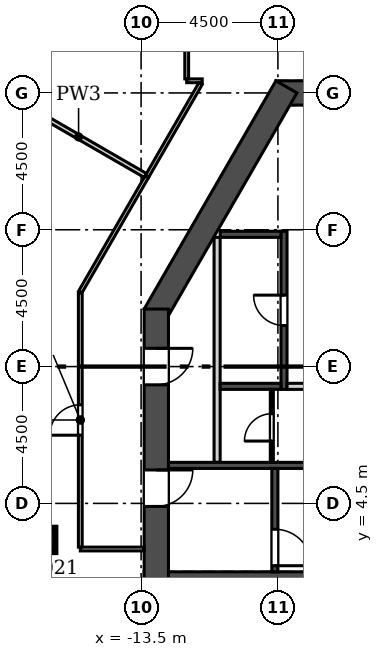
"""IFC4 building model, lengths in metres.
Left out: names, types, materials, properties, quantities, classifications, styles, units other than length and angle.
Written with IfcOpenShell. Run it as: python <this file> out.ifc"""

import sys

from ifc_helpers import new_model, si_unit, direction, frame, frame_2d, origin, origin_2d, place, context, subcontext, project, spatial, rectangle, extrude, element, fill, save


model = new_model("IFC4")
c1 = context("Model", 3, precision=1e-05, world=origin(), true_north=direction((0.0, 1.0)))
c2 = subcontext(c1, "Body", "Model", "MODEL_VIEW")
j1 = project(units=[si_unit("LENGTHUNIT", "METRE"), si_unit("PLANEANGLEUNIT", "RADIAN")], contexts=[c1])
p1 = place(None, origin())
s1 = spatial("IfcSite", under=j1, at=p1, CompositionType="ELEMENT")
p2 = place(p1, origin())
s2 = spatial("IfcBuilding", under=s1, at=p2, CompositionType="ELEMENT")
p3 = place(p2, frame((0.0, 0.0, 335.1)))
s3 = spatial("IfcBuildingStorey", under=s2, at=p3, CompositionType="ELEMENT", Elevation=335.1)
p4 = place(p3, frame((-16.721, 3.299, 0.0), z_axis=(0.0, 0.0, 1.0), x_axis=(1.0, 0.0, 0.0)))
e1 = element("IfcColumn", 1, at=p4, inside=s3, PredefinedType="COLUMN", context=c2, shape_type="SweptSolid", body=[
    extrude(rectangle(XDim=0.8, YDim=0.8, at=origin_2d()), origin(), (0.0, 0.0, 1.0), 4.2),
])
p5 = place(p3, frame((-13.4, 1.85, 0.0), z_axis=(0.0, 0.0, 1.0), x_axis=(1.0, 0.0, 0.0)))
e2 = element("IfcWall", 2, at=p5, inside=s3, PredefinedType="SHEAR", context=c2, shape_type="SweptSolid", body=[
    extrude(rectangle(XDim=26.8, YDim=0.8, at=frame_2d((13.4, 0.0))), origin(), (0.0, 0.0, 1.0), 4.2),
])
p6 = place(p3, frame((9.065, 18.0, 0.0), z_axis=(0.0, 0.0, 1.0), x_axis=(-1.0, 0.0, 0.0)))
e3 = element("IfcWall", 3, at=p6, inside=s3, PredefinedType="SHEAR", context=c2, shape_type="SweptSolid", body=[
    extrude(rectangle(XDim=18.13, YDim=0.8, at=frame_2d((9.065, 0.0))), origin(), (0.0, 0.0, 1.0), 4.2),
])
p7 = place(p6, frame((8.365, 0.0, 0.0)))
e4 = element("IfcOpeningElement", 4, at=p7, cuts=e3, PredefinedType="OPENING", context=c2, shape_type="SweptSolid", body=[
    extrude(rectangle(XDim=1.4, YDim=2.1, at=frame_2d((0.7, 1.05))), frame((0.0, 0.41, 0.0), z_axis=(0.0, -1.0, 0.0), x_axis=(1.0, 0.0, 0.0)), (0.0, 0.0, 1.0), 0.82),
])
p8 = place(p6, frame((11.065, 0.0, 0.0)))
e5 = element("IfcOpeningElement", 5, at=p8, cuts=e3, PredefinedType="OPENING", context=c2, shape_type="SweptSolid", body=[
    extrude(rectangle(XDim=6.0, YDim=2.4, at=frame_2d((3.0, 1.2))), frame((0.0, 0.41, 0.0), z_axis=(0.0, -1.0, 0.0), x_axis=(1.0, 0.0, 0.0)), (0.0, 0.0, 1.0), 0.82),
])
p9 = place(p6, frame((1.065, 0.0, 0.0)))
e6 = element("IfcOpeningElement", 6, at=p9, cuts=e3, PredefinedType="OPENING", context=c2, shape_type="SweptSolid", body=[
    extrude(rectangle(XDim=6.0, YDim=2.4, at=frame_2d((3.0, 1.2))), frame((0.0, 0.41, 0.0), z_axis=(0.0, -1.0, 0.0), x_axis=(1.0, 0.0, 0.0)), (0.0, 0.0, 1.0), 0.82),
])
p10 = place(p3, frame((-8.719, 18.2, 0.0), z_axis=(0.0, 0.0, 1.0), x_axis=(-0.500015780397, -0.866016292776, 0.0)))
e7 = element("IfcWall", 7, at=p10, inside=s3, PredefinedType="SHEAR", context=c2, shape_type="SweptSolid", body=[
    extrude(rectangle(XDim=8.67, YDim=0.8, at=frame_2d((4.335, 0.0))), origin(), (0.0, 0.0, 1.0), 4.2),
])
p11 = place(p3, frame((-13.0, 10.892, 0.0), z_axis=(0.0, 0.0, 1.0), x_axis=(0.0, -1.0, 0.0)))
e8 = element("IfcWall", 8, at=p11, inside=s3, PredefinedType="SHEAR", context=c2, shape_type="SweptSolid", body=[
    extrude(rectangle(XDim=9.442, YDim=0.8, at=frame_2d((4.721, 0.0))), origin(), (0.0, 0.0, 1.0), 4.2),
])
p12 = place(p11, frame((5.292, 0.0, 0.0)))
e9 = element("IfcOpeningElement", 9, at=p12, cuts=e8, PredefinedType="OPENING", context=c2, shape_type="SweptSolid", body=[
    extrude(rectangle(XDim=1.2, YDim=2.1, at=frame_2d((0.6, 1.05))), frame((0.0, 0.41, 0.0), z_axis=(0.0, -1.0, 0.0), x_axis=(1.0, 0.0, 0.0)), (0.0, 0.0, 1.0), 0.82),
])
p13 = place(p11, frame((1.292, 0.0, 0.0)))
e10 = element("IfcOpeningElement", 10, at=p13, cuts=e8, PredefinedType="OPENING", context=c2, shape_type="SweptSolid", body=[
    extrude(rectangle(XDim=1.2, YDim=2.1, at=frame_2d((0.6, 1.05))), frame((0.0, 0.41, 0.0), z_axis=(0.0, -1.0, 0.0), x_axis=(1.0, 0.0, 0.0)), (0.0, 0.0, 1.0), 0.82),
])
p14 = place(p3, frame((-4.353, 41.372, 0.0), z_axis=(0.0, 0.0, 1.0), x_axis=(-0.500001731347, -0.866024404189, 0.0)))
e11 = element("IfcWall", 11, at=p14, inside=s3, PredefinedType="SOLIDWALL", context=c2, shape_type="SweptSolid", body=[
    extrude(rectangle(XDim=38.87, YDim=0.34, at=frame_2d((19.435, 0.0))), origin(), (0.0, 0.0, 1.0), 3.8),
])
p15 = place(p14, frame((3.653, 0.0, 0.9)))
e12 = element("IfcOpeningElement", 12, at=p15, cuts=e11, PredefinedType="OPENING", context=c2, shape_type="SweptSolid", body=[
    extrude(rectangle(XDim=1.885, YDim=2.6, at=frame_2d((0.942, 1.3))), frame((0.0, 0.18, 0.0), z_axis=(0.0, -1.0, 0.0), x_axis=(1.0, 0.0, 0.0)), (0.0, 0.0, 1.0), 0.36),
])
p16 = place(p14, frame((6.653, 0.0, 0.9)))
e13 = element("IfcOpeningElement", 13, at=p16, cuts=e11, PredefinedType="OPENING", context=c2, shape_type="SweptSolid", body=[
    extrude(rectangle(XDim=1.885, YDim=2.6, at=frame_2d((0.942, 1.3))), frame((0.0, 0.18, 0.0), z_axis=(0.0, -1.0, 0.0), x_axis=(1.0, 0.0, 0.0)), (0.0, 0.0, 1.0), 0.36),
])
p17 = place(p14, frame((9.653, 0.0, 0.9)))
e14 = element("IfcOpeningElement", 14, at=p17, cuts=e11, PredefinedType="OPENING", context=c2, shape_type="SweptSolid", body=[
    extrude(rectangle(XDim=1.885, YDim=2.6, at=frame_2d((0.942, 1.3))), frame((0.0, 0.18, 0.0), z_axis=(0.0, -1.0, 0.0), x_axis=(1.0, 0.0, 0.0)), (0.0, 0.0, 1.0), 0.36),
])
p18 = place(p14, frame((12.653, 0.0, 0.9)))
e15 = element("IfcOpeningElement", 15, at=p18, cuts=e11, PredefinedType="OPENING", context=c2, shape_type="SweptSolid", body=[
    extrude(rectangle(XDim=1.885, YDim=2.6, at=frame_2d((0.942, 1.3))), frame((0.0, 0.18, 0.0), z_axis=(0.0, -1.0, 0.0), x_axis=(1.0, 0.0, 0.0)), (0.0, 0.0, 1.0), 0.36),
])
p19 = place(p14, frame((15.653, 0.0, 0.9)))
e16 = element("IfcOpeningElement", 16, at=p19, cuts=e11, PredefinedType="OPENING", context=c2, shape_type="SweptSolid", body=[
    extrude(rectangle(XDim=1.885, YDim=2.6, at=frame_2d((0.942, 1.3))), frame((0.0, 0.18, 0.0), z_axis=(0.0, -1.0, 0.0), x_axis=(1.0, 0.0, 0.0)), (0.0, 0.0, 1.0), 0.36),
])
p20 = place(p14, frame((18.653, 0.0, 0.9)))
e17 = element("IfcOpeningElement", 17, at=p20, cuts=e11, PredefinedType="OPENING", context=c2, shape_type="SweptSolid", body=[
    extrude(rectangle(XDim=1.885, YDim=2.6, at=frame_2d((0.942, 1.3))), frame((0.0, 0.18, 0.0), z_axis=(0.0, -1.0, 0.0), x_axis=(1.0, 0.0, 0.0)), (0.0, 0.0, 1.0), 0.36),
])
p21 = place(p14, frame((21.653, 0.0, 0.9)))
e18 = element("IfcOpeningElement", 18, at=p21, cuts=e11, PredefinedType="OPENING", context=c2, shape_type="SweptSolid", body=[
    extrude(rectangle(XDim=1.885, YDim=2.6, at=frame_2d((0.942, 1.3))), frame((0.0, 0.18, 0.0), z_axis=(0.0, -1.0, 0.0), x_axis=(1.0, 0.0, 0.0)), (0.0, 0.0, 1.0), 0.36),
])
p22 = place(p14, frame((24.653, 0.0, 0.9)))
e19 = element("IfcOpeningElement", 19, at=p22, cuts=e11, PredefinedType="OPENING", context=c2, shape_type="SweptSolid", body=[
    extrude(rectangle(XDim=1.885, YDim=2.6, at=frame_2d((0.942, 1.3))), frame((0.0, 0.18, 0.0), z_axis=(0.0, -1.0, 0.0), x_axis=(1.0, 0.0, 0.0)), (0.0, 0.0, 1.0), 0.36),
])
p23 = place(p14, frame((27.653, 0.0, 0.9)))
e20 = element("IfcOpeningElement", 20, at=p23, cuts=e11, PredefinedType="OPENING", context=c2, shape_type="SweptSolid", body=[
    extrude(rectangle(XDim=1.885, YDim=2.6, at=frame_2d((0.942, 1.3))), frame((0.0, 0.18, 0.0), z_axis=(0.0, -1.0, 0.0), x_axis=(1.0, 0.0, 0.0)), (0.0, 0.0, 1.0), 0.36),
])
p24 = place(p14, frame((30.653, 0.0, 0.9)))
e21 = element("IfcOpeningElement", 21, at=p24, cuts=e11, PredefinedType="OPENING", context=c2, shape_type="SweptSolid", body=[
    extrude(rectangle(XDim=1.885, YDim=2.6, at=frame_2d((0.942, 1.3))), frame((0.0, 0.18, 0.0), z_axis=(0.0, -1.0, 0.0), x_axis=(1.0, 0.0, 0.0)), (0.0, 0.0, 1.0), 0.36),
])
p25 = place(p14, frame((33.653, 0.0, 0.9)))
e22 = element("IfcOpeningElement", 22, at=p25, cuts=e11, PredefinedType="OPENING", context=c2, shape_type="SweptSolid", body=[
    extrude(rectangle(XDim=1.885, YDim=2.6, at=frame_2d((0.942, 1.3))), frame((0.0, 0.18, 0.0), z_axis=(0.0, -1.0, 0.0), x_axis=(1.0, 0.0, 0.0)), (0.0, 0.0, 1.0), 0.36),
])
p26 = place(p14, frame((1.269, 0.0, 0.9)))
e23 = element("IfcOpeningElement", 23, at=p26, cuts=e11, PredefinedType="OPENING", context=c2, shape_type="SweptSolid", body=[
    extrude(rectangle(XDim=1.115, YDim=2.4, at=frame_2d((0.558, 1.2))), frame((0.0, 0.18, 0.0), z_axis=(0.0, -1.0, 0.0), x_axis=(1.0, 0.0, 0.0)), (0.0, 0.0, 1.0), 0.36),
])
p27 = place(p14, frame((36.646, 0.0, 0.9)))
e24 = element("IfcOpeningElement", 24, at=p27, cuts=e11, PredefinedType="OPENING", context=c2, shape_type="SweptSolid", body=[
    extrude(rectangle(XDim=1.115, YDim=2.4, at=frame_2d((0.558, 1.2))), frame((0.0, 0.18, 0.0), z_axis=(0.0, -1.0, 0.0), x_axis=(1.0, 0.0, 0.0)), (0.0, 0.0, 1.0), 0.36),
])
p28 = place(p3, frame((-11.0, 5.85, 0.0), z_axis=(0.0, 0.0, 1.0), x_axis=(0.0, 1.0, 0.0)))
e25 = element("IfcWall", 25, at=p28, inside=s3, PredefinedType="SOLIDWALL", context=c2, shape_type="SweptSolid", body=[
    extrude(rectangle(XDim=7.4, YDim=0.2, at=frame_2d((3.7, 0.0))), origin(), (0.0, 0.0, 1.0), 3.8),
])
p29 = place(p3, frame((-8.8, 8.25, -0.4), z_axis=(0.0, 0.0, 1.0), x_axis=(0.0, 1.0, 0.0)))
e26 = element("IfcWall", 26, at=p29, inside=s3, PredefinedType="SOLIDWALL", context=c2, shape_type="SweptSolid", body=[
    extrude(rectangle(XDim=5.2, YDim=0.2, at=frame_2d((2.6, 0.0))), origin(), (0.0, 0.0, 1.0), 4.2),
])
p30 = place(p29, frame((2.1, 0.0, 0.4)))
e27 = element("IfcOpeningElement", 27, at=p30, cuts=e26, PredefinedType="OPENING", context=c2, shape_type="SweptSolid", body=[
    extrude(rectangle(XDim=1.0, YDim=2.1, at=frame_2d((0.5, 1.05))), frame((0.0, 0.11, 0.0), z_axis=(0.0, -1.0, 0.0), x_axis=(1.0, 0.0, 0.0)), (0.0, 0.0, 1.0), 0.22),
])
p31 = place(p3, frame((-10.9, 8.35, -0.4), z_axis=(0.0, 0.0, 1.0), x_axis=(1.0, 0.0, 0.0)))
e28 = element("IfcWall", 28, at=p31, inside=s3, PredefinedType="SOLIDWALL", context=c2, shape_type="SweptSolid", body=[
    extrude(rectangle(XDim=2.0, YDim=0.2, at=frame_2d((1.0, 0.0))), origin(), (0.0, 0.0, 1.0), 4.2),
])
p32 = place(p3, frame((-12.6, 5.75, -0.4), z_axis=(0.0, 0.0, 1.0), x_axis=(1.0, 0.0, 0.0)))
e29 = element("IfcWall", 29, at=p32, inside=s3, PredefinedType="SOLIDWALL", context=c2, shape_type="SweptSolid", body=[
    extrude(rectangle(XDim=11.4, YDim=0.2, at=frame_2d((5.7, 0.0))), origin(), (0.0, 0.0, 1.0), 4.2),
])
p33 = place(p3, frame((-9.1, 2.25, -0.4), z_axis=(0.0, 0.0, 1.0), x_axis=(0.0, 1.0, 0.0)))
e30 = element("IfcWall", 30, at=p33, inside=s3, PredefinedType="SOLIDWALL", context=c2, shape_type="SweptSolid", body=[
    extrude(rectangle(XDim=3.4, YDim=0.2, at=frame_2d((1.7, 0.0))), origin(), (0.0, 0.0, 1.0), 4.2),
])
p34 = place(p33, frame((0.2, 0.0, 0.4)))
e31 = element("IfcOpeningElement", 31, at=p34, cuts=e30, PredefinedType="OPENING", context=c2, shape_type="SweptSolid", body=[
    extrude(rectangle(XDim=1.2, YDim=2.1, at=frame_2d((0.6, 1.05))), frame((0.0, 0.11, 0.0), z_axis=(0.0, -1.0, 0.0), x_axis=(1.0, 0.0, 0.0)), (0.0, 0.0, 1.0), 0.22),
])
p35 = place(p3, frame((-10.9, 13.35, -0.4), z_axis=(0.0, 0.0, 1.0), x_axis=(1.0, 0.0, 0.0)))
e32 = element("IfcWall", 32, at=p35, inside=s3, PredefinedType="SOLIDWALL", context=c2, shape_type="SweptSolid", body=[
    extrude(rectangle(XDim=2.0, YDim=0.2, at=frame_2d((1.0, 0.0))), origin(), (0.0, 0.0, 1.0), 4.2),
])
p36 = place(p3, frame((-9.2, 5.85, 0.0), z_axis=(0.0, 0.0, 1.0), x_axis=(0.0, 1.0, 0.0)))
e33 = element("IfcWall", 33, at=p36, inside=s3, PredefinedType="PARTITIONING", context=c2, shape_type="SweptSolid", body=[
    extrude(rectangle(XDim=2.4, YDim=0.1, at=frame_2d((1.2, 0.0))), origin(), (0.0, 0.0, 1.0), 3.8),
])
p37 = place(p36, frame((0.7, 0.0, 0.0)))
e34 = element("IfcOpeningElement", 34, at=p37, cuts=e33, PredefinedType="OPENING", context=c2, shape_type="SweptSolid", body=[
    extrude(rectangle(XDim=0.9, YDim=2.1, at=frame_2d((0.45, 1.05))), frame((0.0, 0.06, 0.0), z_axis=(0.0, -1.0, 0.0), x_axis=(1.0, 0.0, 0.0)), (0.0, 0.0, 1.0), 0.12),
])
p38 = place(p3, frame((-8.7, 8.35, 0.0), z_axis=(0.0, 0.0, 1.0), x_axis=(1.0, 0.0, 0.0)))
e35 = element("IfcWall", 35, at=p38, inside=s3, PredefinedType="SOLIDWALL", context=c2, shape_type="SweptSolid", body=[
    extrude(rectangle(XDim=2.8, YDim=0.2, at=frame_2d((1.4, 0.0))), origin(), (0.0, 0.0, 1.0), 3.8),
])
p39 = place(p38, frame((0.9, 0.0, 0.0)))
e36 = element("IfcOpeningElement", 36, at=p39, cuts=e35, PredefinedType="OPENING", context=c2, shape_type="SweptSolid", body=[
    extrude(rectangle(XDim=1.0, YDim=2.1, at=frame_2d((0.5, 1.05))), frame((0.0, 0.11, 0.0), z_axis=(0.0, -1.0, 0.0), x_axis=(1.0, 0.0, 0.0)), (0.0, 0.0, 1.0), 0.22),
])
p40 = place(p3, frame((-11.49, 18.4, 0.0), z_axis=(0.0, 0.0, 1.0), x_axis=(-1.0, 0.0, 0.0)))
e37 = element("IfcWall", 37, at=p40, inside=s3, PredefinedType="PARTITIONING", context=c2, shape_type="SweptSolid", body=[
    extrude(rectangle(XDim=0.51, YDim=0.125, at=frame_2d((0.255, 0.0))), origin(), (0.0, 0.0, 1.0), 3.8),
])
p41 = place(p3, frame((-12.0, 18.462, 0.0), z_axis=(0.0, 0.0, 1.0), x_axis=(0.0, 1.0, 0.0)))
e38 = element("IfcWall", 38, at=p41, inside=s3, PredefinedType="PARTITIONING", context=c2, shape_type="SweptSolid", body=[
    extrude(rectangle(XDim=2.375, YDim=0.125, at=frame_2d((1.187, 0.0))), origin(), (0.0, 0.0, 1.0), 3.8),
])
p42 = place(p3, frame((-13.306, 15.254, 0.0), z_axis=(0.0, 0.0, 1.0), x_axis=(0.499984357326, 0.866034434898, 0.0)))
e39 = element("IfcWall", 39, at=p42, inside=s3, PredefinedType="PARTITIONING", context=c2, shape_type="SweptSolid", body=[
    extrude(rectangle(XDim=3.523, YDim=0.125, at=frame_2d((1.762, 0.0))), origin(), (0.0, 0.0, 1.0), 3.8),
])
p43 = place(p3, frame((-13.4, 3.0, 0.0), z_axis=(0.0, 0.0, 1.0), x_axis=(-1.0, 0.0, 0.0)))
e40 = element("IfcWall", 40, at=p43, inside=s3, PredefinedType="PARTITIONING", context=c2, shape_type="SweptSolid", body=[
    extrude(rectangle(XDim=2.1, YDim=0.125, at=frame_2d((1.05, 0.0))), origin(), (0.0, 0.0, 1.0), 3.8),
])
p44 = place(p3, frame((-15.5, 3.062, 0.0), z_axis=(0.0, 0.0, 1.0), x_axis=(0.0, 1.0, 0.0)))
e41 = element("IfcWall", 41, at=p44, inside=s3, PredefinedType="PARTITIONING", context=c2, shape_type="SweptSolid", body=[
    extrude(rectangle(XDim=8.361, YDim=0.125, at=frame_2d((4.181, 0.0))), origin(), (0.0, 0.0, 1.0), 3.8),
])
p45 = place(p44, frame((3.68, 0.0, 0.0)))
e42 = element("IfcOpeningElement", 42, at=p45, cuts=e41, PredefinedType="OPENING", context=c2, shape_type="SweptSolid", body=[
    extrude(rectangle(XDim=1.0, YDim=2.1, at=frame_2d((0.5, 1.05))), frame((0.0, 0.073, 0.0), z_axis=(0.0, -1.0, 0.0), x_axis=(1.0, 0.0, 0.0)), (0.0, 0.0, 1.0), 0.145),
])
p46 = place(p3, frame((-15.5, 11.455, 0.0), z_axis=(0.0, 0.0, 1.0), x_axis=(0.500005024956, 0.866022502605, 0.0)))
e43 = element("IfcWall", 43, at=p46, inside=s3, PredefinedType="PARTITIONING", context=c2, shape_type="SweptSolid", body=[
    extrude(rectangle(XDim=4.388, YDim=0.125, at=frame_2d((2.194, 0.0))), origin(), (0.0, 0.0, 1.0), 3.8),
])
p47 = place(p3, frame((-13.36, 15.285, 0.0), z_axis=(0.0, 0.0, 1.0), x_axis=(-0.86601005171, 0.50002658963, 0.0)))
e44 = element("IfcWall", 44, at=p47, inside=s3, PredefinedType="PARTITIONING", context=c2, shape_type="SweptSolid", body=[
    extrude(rectangle(XDim=5.073, YDim=0.15, at=frame_2d((2.536, 0.0))), origin(), (0.0, 0.0, 1.0), 3.8),
])
p48 = place(p30, origin())
e45 = element("IfcDoor", 45, at=p48, inside=s3, OperationType="SINGLE_SWING_RIGHT", PredefinedType="DOOR", context=c2, shape_type="SweptSolid", body=[
    extrude(rectangle(XDim=1.0, YDim=2.1, at=frame_2d((0.5, 1.05))), frame((0.0, 0.025, 0.0), z_axis=(0.0, -1.0, 0.0), x_axis=(1.0, 0.0, 0.0)), (0.0, 0.0, 1.0), 0.05),
])
fill(e27, e45)
p49 = place(p37, origin())
e46 = element("IfcDoor", 46, at=p49, inside=s3, OperationType="SINGLE_SWING_LEFT", PredefinedType="DOOR", context=c2, shape_type="SweptSolid", body=[
    extrude(rectangle(XDim=0.9, YDim=2.1, at=frame_2d((0.45, 1.05))), frame((0.0, 0.025, 0.0), z_axis=(0.0, -1.0, 0.0), x_axis=(1.0, 0.0, 0.0)), (0.0, 0.0, 1.0), 0.05),
])
fill(e34, e46)
p50 = place(p12, origin())
e47 = element("IfcDoor", 47, at=p50, inside=s3, OperationType="SINGLE_SWING_LEFT", PredefinedType="DOOR", context=c2, shape_type="SweptSolid", body=[
    extrude(rectangle(XDim=1.2, YDim=2.1, at=frame_2d((0.6, 1.05))), frame((0.0, 0.025, 0.0), z_axis=(0.0, -1.0, 0.0), x_axis=(1.0, 0.0, 0.0)), (0.0, 0.0, 1.0), 0.05),
])
fill(e9, e47)
p51 = place(p34, frame((1.2, 0.0, 0.0), z_axis=(0.0, 0.0, 1.0), x_axis=(-1.0, 0.0, 0.0)))
e48 = element("IfcDoor", 48, at=p51, inside=s3, OperationType="SINGLE_SWING_RIGHT", PredefinedType="DOOR", context=c2, shape_type="SweptSolid", body=[
    extrude(rectangle(XDim=1.2, YDim=2.1, at=frame_2d((0.6, 1.05))), frame((0.0, 0.025, 0.0), z_axis=(0.0, -1.0, 0.0), x_axis=(1.0, 0.0, 0.0)), (0.0, 0.0, 1.0), 0.05),
])
fill(e31, e48)
p52 = place(p13, origin())
e49 = element("IfcDoor", 49, at=p52, inside=s3, OperationType="SINGLE_SWING_LEFT", PredefinedType="DOOR", context=c2, shape_type="SweptSolid", body=[
    extrude(rectangle(XDim=1.2, YDim=2.1, at=frame_2d((0.6, 1.05))), frame((0.0, 0.025, 0.0), z_axis=(0.0, -1.0, 0.0), x_axis=(1.0, 0.0, 0.0)), (0.0, 0.0, 1.0), 0.05),
])
fill(e10, e49)
p53 = place(p45, origin())
e50 = element("IfcDoor", 50, at=p53, inside=s3, OperationType="SINGLE_SWING_LEFT", PredefinedType="DOOR", context=c2, shape_type="SweptSolid", body=[
    extrude(rectangle(XDim=1.0, YDim=2.1, at=frame_2d((0.5, 1.05))), frame((0.0, 0.025, 0.0), z_axis=(0.0, -1.0, 0.0), x_axis=(1.0, 0.0, 0.0)), (0.0, 0.0, 1.0), 0.05),
])
fill(e42, e50)
save(model, sys.argv[1])
